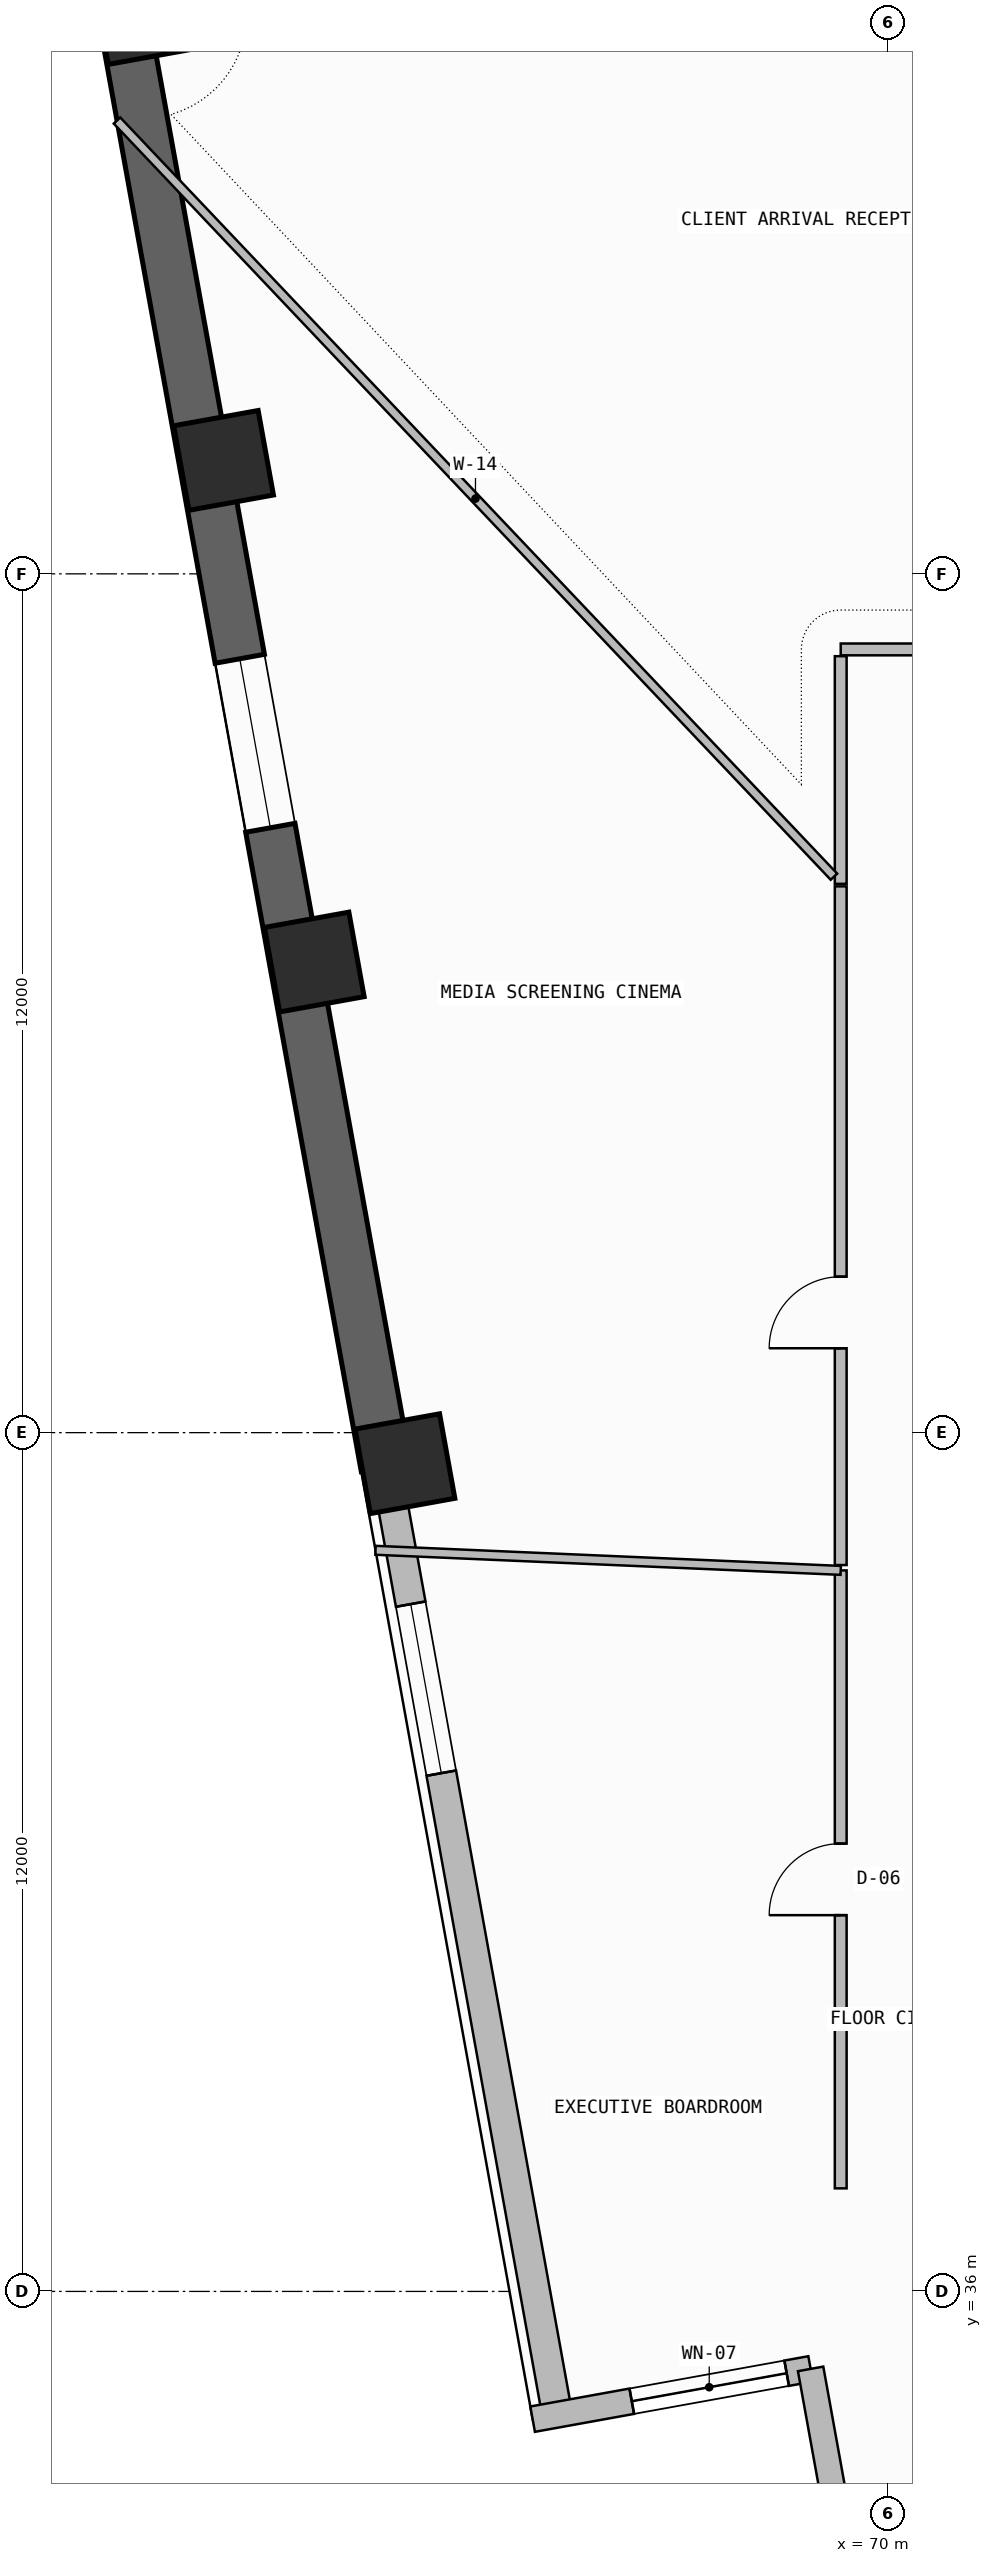
"""IFC4 building model, lengths in metres.
Left out: names, types, materials, properties, quantities, classifications, styles, units other than length and angle.
Written with IfcOpenShell. Run it as: python <this file> out.ifc"""

import sys

from ifc_helpers import new_model, si_unit, direction, frame, frame_2d, origin, origin_2d, place, context, subcontext, project, spatial, rectangle, extrude, element, fill, save


model = new_model("IFC4")
c1 = context("Model", 3, precision=1e-05, world=origin(), true_north=direction((0.0, 1.0)))
c2 = subcontext(c1, "Body", "Model", "MODEL_VIEW")
j1 = project(units=[si_unit("LENGTHUNIT", "METRE"), si_unit("PLANEANGLEUNIT", "RADIAN")], contexts=[c1])
p1 = place(None, origin())
s1 = spatial("IfcSite", under=j1, at=p1, CompositionType="ELEMENT")
p2 = place(p1, origin())
s2 = spatial("IfcBuilding", under=s1, at=p2, CompositionType="ELEMENT")
p3 = place(p2, frame((0.0, 0.0, 117.3)))
s3 = spatial("IfcBuildingStorey", under=s2, at=p3, CompositionType="ELEMENT", Elevation=117.3)
for number, where, z_axis, x_axis in (
    (1, (59.594, 67.816, 0.0), (0.0, 0.0, 1.0), (-0.178, 0.984, 0.0)),
    (2, (60.72, 61.585, 0.0), (0.0, 0.0, 1.0), (-0.178, 0.984, 0.0)),
    (3, (61.988, 54.575, 0.0), (0.0, 0.0, 1.0), (-0.178, 0.984, 0.0)),
    (4, (63.255, 47.566, 0.0), (0.0, 0.0, 1.0), (-0.178, 0.984, 0.0)),
):
    element("IfcColumn", number, at=place(p3, frame(where, z_axis=z_axis, x_axis=x_axis)), inside=s3, PredefinedType="COLUMN", context=c2, shape_type="SweptSolid", body=[
        extrude(rectangle(XDim=1.2, YDim=1.2, at=origin_2d()), origin(), (0.0, 0.0, 1.0), 3.6),
    ])
p4 = place(p3, frame((69.565, 31.377, 0.0), z_axis=(0.0, 0.0, 1.0), x_axis=(0.98404091451, 0.177942346197, 0.0)))
e5 = element("IfcWall", 5, at=p4, inside=s3, PredefinedType="SOLIDWALL", context=c2, shape_type="SweptSolid", body=[
    extrude(rectangle(XDim=15.583, YDim=0.42, at=frame_2d((7.792, 0.0))), origin(), (0.0, 0.0, 1.0), 3.34),
])
p5 = place(p4, frame((10.5, 0.0, 1.2)))
e6 = element("IfcOpeningElement", 6, at=p5, cuts=e5, PredefinedType="OPENING", context=c2, shape_type="SweptSolid", body=[
    extrude(rectangle(XDim=2.4, YDim=0.9, at=frame_2d((1.2, 0.45))), frame((0.0, 0.22, 0.0), z_axis=(0.0, -1.0, 0.0), x_axis=(1.0, 0.0, 0.0)), (0.0, 0.0, 1.0), 0.44),
])
p6 = place(p3, frame((59.328, 67.768, -0.26), z_axis=(0.0, 0.0, 1.0), x_axis=(0.177933213615, -0.984042565895, 0.0)))
e7 = element("IfcWall", 7, at=p6, inside=s3, PredefinedType="SHEAR", context=c2, shape_type="SweptSolid", body=[
    extrude(rectangle(XDim=20.579, YDim=0.7, at=frame_2d((10.289, 0.0))), origin(), (0.0, 0.0, 1.0), 3.6),
])
p7 = place(p6, frame((9.1, 0.0, 1.2)))
e8 = element("IfcOpeningElement", 8, at=p7, cuts=e7, PredefinedType="OPENING", context=c2, shape_type="SweptSolid", body=[
    extrude(rectangle(XDim=2.4, YDim=0.9, at=frame_2d((1.2, 0.45))), frame((0.0, 0.36, 0.0), z_axis=(0.0, -1.0, 0.0), x_axis=(1.0, 0.0, 0.0)), (0.0, 0.0, 1.0), 0.72),
])
p8 = place(p3, frame((62.99, 47.518, 0.0), z_axis=(0.0, 0.0, 1.0), x_axis=(0.177948058674, -0.984039881516, 0.0)))
e9 = element("IfcWall", 9, at=p8, inside=s3, PredefinedType="SOLIDWALL", context=c2, shape_type="SweptSolid", body=[
    extrude(rectangle(XDim=13.455, YDim=0.42, at=frame_2d((6.728, 0.0))), origin(), (0.0, 0.0, 1.0), 2.725),
])
p9 = place(p8, frame((1.945, 0.0, 1.2)))
e10 = element("IfcOpeningElement", 10, at=p9, cuts=e9, PredefinedType="OPENING", context=c2, shape_type="SweptSolid", body=[
    extrude(rectangle(XDim=2.4, YDim=0.9, at=frame_2d((1.2, 0.45))), frame((0.0, 0.22, 0.0), z_axis=(0.0, -1.0, 0.0), x_axis=(1.0, 0.0, 0.0)), (0.0, 0.0, 1.0), 0.44),
])
p10 = place(p3, frame((65.039, 34.215, 0.0), z_axis=(0.0, 0.0, 1.0), x_axis=(0.984046535247, 0.177911260096, 0.0)))
e11 = element("IfcWall", 11, at=p10, inside=s3, PredefinedType="SOLIDWALL", context=c2, shape_type="SweptSolid", body=[
    extrude(rectangle(XDim=3.948, YDim=0.36, at=frame_2d((1.974, 0.0))), origin(), (0.0, 0.0, 1.0), 3.34),
])
p11 = place(p10, frame((1.408, 0.0, 0.45)))
e12 = element("IfcOpeningElement", 12, at=p11, cuts=e11, PredefinedType="OPENING", context=c2, shape_type="SweptSolid", body=[
    extrude(rectangle(XDim=2.2, YDim=2.4, at=frame_2d((1.1, 1.2))), frame((0.0, 0.19, 0.0), z_axis=(0.0, -1.0, 0.0), x_axis=(1.0, 0.0, 0.0)), (0.0, 0.0, 1.0), 0.38),
])
p12 = place(p3, frame((68.924, 34.917, 0.0), z_axis=(0.0, 0.0, 1.0), x_axis=(0.177981971326, -0.984033748346, 0.0)))
e13 = element("IfcWall", 13, at=p12, inside=s3, PredefinedType="SOLIDWALL", context=c2, shape_type="SweptSolid", body=[
    extrude(rectangle(XDim=3.948, YDim=0.36, at=frame_2d((1.974, 0.0))), origin(), (0.0, 0.0, 1.0), 3.34),
])
p13 = place(p3, frame((88.921, 61.823, 0.0), z_axis=(0.0, 0.0, 1.0), x_axis=(-0.897993533426, 0.440008652103, 0.0)))
e14 = element("IfcWall", 14, at=p13, inside=s3, PredefinedType="PARAPET", context=c2, shape_type="SweptSolid", body=[
    extrude(rectangle(XDim=26.864, YDim=0.2, at=frame_2d((13.432, 0.0))), origin(), (0.0, 0.0, 1.0), 1.15),
])
p14 = place(p3, frame((69.345, 46.075, 0.0), z_axis=(0.0, 0.0, 1.0), x_axis=(0.0, -1.0, 0.0)))
e15 = element("IfcWall", 15, at=p14, inside=s3, PredefinedType="PARTITIONING", context=c2, shape_type="SweptSolid", body=[
    extrude(rectangle(XDim=8.635, YDim=0.165, at=frame_2d((4.317, 0.0))), origin(), (0.0, 0.0, 1.0), 3.34),
])
p15 = place(p14, frame((3.818, 0.0, 0.0)))
e16 = element("IfcOpeningElement", 16, at=p15, cuts=e15, PredefinedType="OPENING", context=c2, shape_type="SweptSolid", body=[
    extrude(rectangle(XDim=1.0, YDim=2.2, at=frame_2d((0.5, 1.1))), frame((0.0, 0.093, 0.0), z_axis=(0.0, -1.0, 0.0), x_axis=(1.0, 0.0, 0.0)), (0.0, 0.0, 1.0), 0.185),
])
p16 = place(p3, frame((62.844, 46.356, 0.0), z_axis=(0.0, 0.0, 1.0), x_axis=(0.999068717199, -0.043147402162, 0.0)))
e17 = element("IfcWall", 17, at=p16, inside=s3, PredefinedType="PARTITIONING", context=c2, shape_type="SweptSolid", body=[
    extrude(rectangle(XDim=6.507, YDim=0.125, at=frame_2d((3.253, 0.0))), origin(), (0.0, 0.0, 1.0), 3.34),
])
p17 = place(p3, frame((78.916, 58.944, 0.0), z_axis=(0.0, 0.0, 1.0), x_axis=(-1.0, 0.0, 0.0)))
e18 = element("IfcWall", 18, at=p17, inside=s3, PredefinedType="PARTITIONING", context=c2, shape_type="SweptSolid", body=[
    extrude(rectangle(XDim=9.571, YDim=0.165, at=frame_2d((4.786, 0.0))), origin(), (0.0, 0.0, 1.0), 2.725),
])
p18 = place(p17, frame((3.06, 0.0, 0.0)))
e19 = element("IfcOpeningElement", 19, at=p18, cuts=e18, PredefinedType="OPENING", context=c2, shape_type="SweptSolid", body=[
    extrude(rectangle(XDim=1.0, YDim=2.2, at=frame_2d((0.5, 1.1))), frame((0.0, 0.093, 0.0), z_axis=(0.0, -1.0, 0.0), x_axis=(1.0, 0.0, 0.0)), (0.0, 0.0, 1.0), 0.185),
])
p19 = place(p3, frame((69.345, 58.85, 0.0), z_axis=(0.0, 0.0, 1.0), x_axis=(0.0, -1.0, 0.0)))
e20 = element("IfcWall", 20, at=p19, inside=s3, PredefinedType="PARTITIONING", context=c2, shape_type="SweptSolid", body=[
    extrude(rectangle(XDim=3.181, YDim=0.165, at=frame_2d((1.591, 0.0))), origin(), (0.0, 0.0, 1.0), 2.725),
])
p20 = place(p3, frame((69.25, 55.768, 0.0), z_axis=(0.0, 0.0, 1.0), x_axis=(-0.688078949666, 0.725635830859, 0.0)))
e21 = element("IfcWall", 21, at=p20, inside=s3, PredefinedType="PARTITIONING", context=c2, shape_type="SweptSolid", body=[
    extrude(rectangle(XDim=14.561, YDim=0.125, at=frame_2d((7.281, 0.0))), origin(), (0.0, 0.0, 1.0), 2.725),
])
p21 = place(p3, frame((69.345, 55.633, 0.0), z_axis=(0.0, 0.0, 1.0), x_axis=(0.0, -1.0, 0.0)))
e22 = element("IfcWall", 22, at=p21, inside=s3, PredefinedType="PARTITIONING", context=c2, shape_type="SweptSolid", body=[
    extrude(rectangle(XDim=9.483, YDim=0.165, at=frame_2d((4.742, 0.0))), origin(), (0.0, 0.0, 1.0), 2.725),
])
p22 = place(p21, frame((5.454, 0.0, 0.0)))
e23 = element("IfcOpeningElement", 23, at=p22, cuts=e22, PredefinedType="OPENING", context=c2, shape_type="SweptSolid", body=[
    extrude(rectangle(XDim=1.0, YDim=2.2, at=frame_2d((0.5, 1.1))), frame((0.0, 0.093, 0.0), z_axis=(0.0, -1.0, 0.0), x_axis=(1.0, 0.0, 0.0)), (0.0, 0.0, 1.0), 0.185),
])
p23 = place(p7, origin())
e24 = element("IfcWindow", 24, at=p23, inside=s3, PartitioningType="SINGLE_PANEL", PredefinedType="WINDOW", context=c2, shape_type="SweptSolid", body=[
    extrude(rectangle(XDim=2.4, YDim=0.9, at=frame_2d((1.2, 0.45))), frame((0.0, 0.03, 0.0), z_axis=(0.0, -1.0, 0.0), x_axis=(1.0, 0.0, 0.0)), (0.0, 0.0, 1.0), 0.06),
])
fill(e8, e24)
p24 = place(p9, origin())
e25 = element("IfcWindow", 25, at=p24, inside=s3, PartitioningType="SINGLE_PANEL", PredefinedType="WINDOW", context=c2, shape_type="SweptSolid", body=[
    extrude(rectangle(XDim=2.4, YDim=0.9, at=frame_2d((1.2, 0.45))), frame((0.0, 0.03, 0.0), z_axis=(0.0, -1.0, 0.0), x_axis=(1.0, 0.0, 0.0)), (0.0, 0.0, 1.0), 0.06),
])
fill(e10, e25)
p25 = place(p11, origin())
e26 = element("IfcWindow", 26, at=p25, inside=s3, PartitioningType="SINGLE_PANEL", PredefinedType="WINDOW", context=c2, shape_type="SweptSolid", body=[
    extrude(rectangle(XDim=2.2, YDim=2.4, at=frame_2d((1.1, 1.2))), frame((0.0, 0.03, 0.0), z_axis=(0.0, -1.0, 0.0), x_axis=(1.0, 0.0, 0.0)), (0.0, 0.0, 1.0), 0.06),
])
fill(e12, e26)
p26 = place(p15, frame((1.0, 0.0, 0.0), z_axis=(0.0, 0.0, 1.0), x_axis=(-1.0, 0.0, 0.0)))
e27 = element("IfcDoor", 27, at=p26, inside=s3, OperationType="SINGLE_SWING_LEFT", PredefinedType="DOOR", context=c2, shape_type="SweptSolid", body=[
    extrude(rectangle(XDim=1.0, YDim=2.2, at=frame_2d((0.5, 1.1))), frame((0.0, 0.025, 0.0), z_axis=(0.0, -1.0, 0.0), x_axis=(1.0, 0.0, 0.0)), (0.0, 0.0, 1.0), 0.05),
])
fill(e16, e27)
p27 = place(p22, frame((1.0, 0.0, 0.0), z_axis=(0.0, 0.0, 1.0), x_axis=(-1.0, 0.0, 0.0)))
e28 = element("IfcDoor", 28, at=p27, inside=s3, OperationType="SINGLE_SWING_LEFT", PredefinedType="DOOR", context=c2, shape_type="SweptSolid", body=[
    extrude(rectangle(XDim=1.0, YDim=2.2, at=frame_2d((0.5, 1.1))), frame((0.0, 0.025, 0.0), z_axis=(0.0, -1.0, 0.0), x_axis=(1.0, 0.0, 0.0)), (0.0, 0.0, 1.0), 0.05),
])
fill(e23, e28)
save(model, sys.argv[1])
